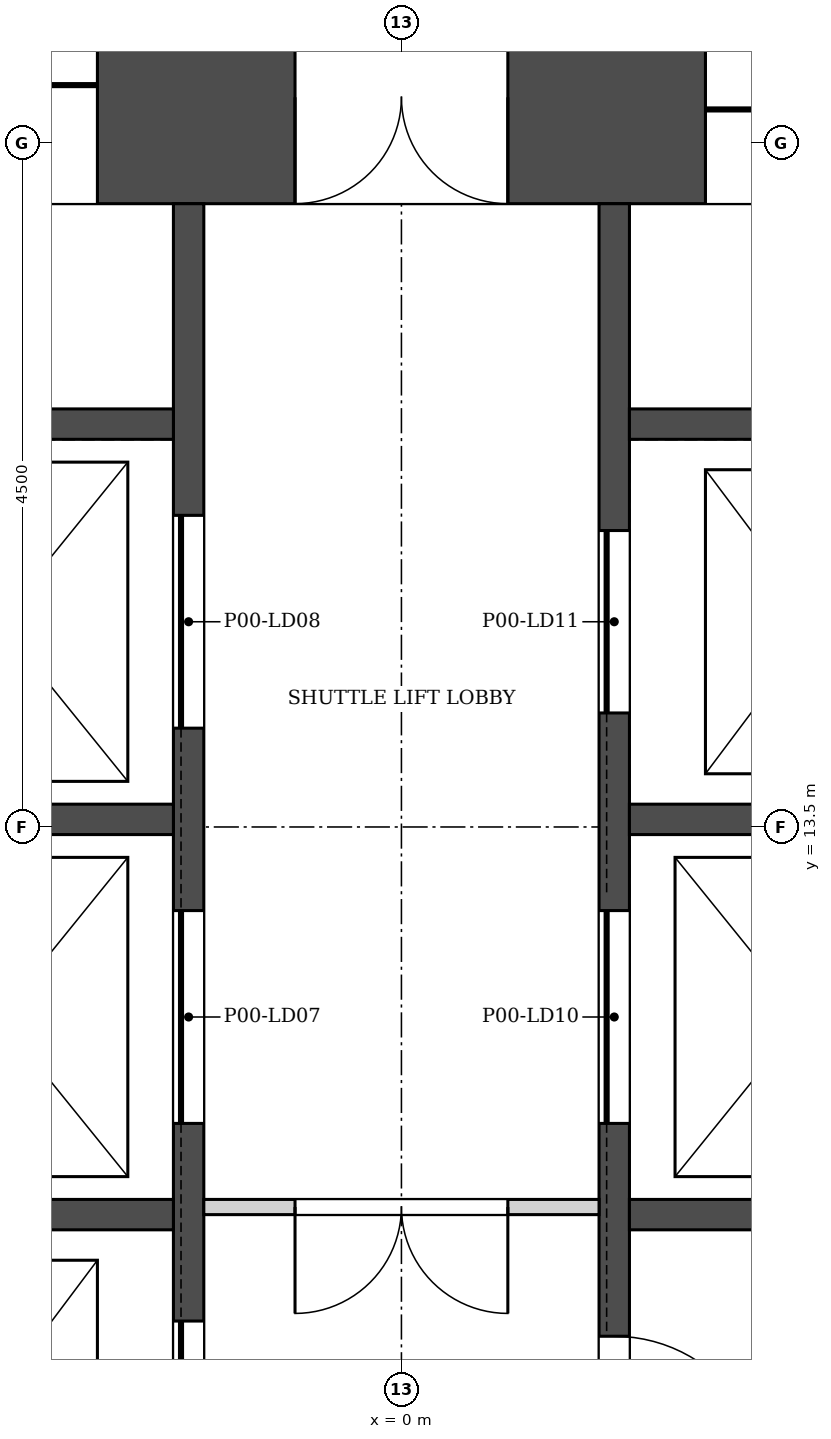
"""IFC4 building model, lengths in metres.
Left out: names, types, materials, properties, quantities, classifications, styles, units other than length and angle.
Written with IfcOpenShell. Run it as: python <this file> out.ifc"""

import sys

from ifc_helpers import new_model, si_unit, direction, frame, frame_2d, origin, place, context, subcontext, project, spatial, rectangle, extrude, element, fill, save


model = new_model("IFC4")
c1 = context("Model", 3, precision=1e-05, world=origin(), true_north=direction((0.0, 1.0)))
c2 = subcontext(c1, "Body", "Model", "MODEL_VIEW")
j1 = project(units=[si_unit("LENGTHUNIT", "METRE"), si_unit("PLANEANGLEUNIT", "RADIAN")], contexts=[c1])
p1 = place(None, origin())
s1 = spatial("IfcSite", under=j1, at=p1, CompositionType="ELEMENT")
p2 = place(p1, origin())
s2 = spatial("IfcBuilding", under=s1, at=p2, CompositionType="ELEMENT")
p3 = place(p2, origin())
s3 = spatial("IfcBuildingStorey", under=s2, at=p3, CompositionType="ELEMENT", Elevation=0.0)
p4 = place(p3, frame((9.412, 18.3, 0.0), z_axis=(0.0, 0.0, 1.0), x_axis=(-1.0, 0.0, 0.0)))
e1 = element("IfcWall", 1, at=p4, inside=s3, PredefinedType="SHEAR", context=c2, shape_type="SweptSolid", body=[
    extrude(rectangle(XDim=18.823, YDim=1.4, at=frame_2d((9.412, 0.0))), origin(), (0.0, 0.0, 1.0), 8.0),
])
p5 = place(p4, frame((8.711, 0.0, 0.0)))
e2 = element("IfcOpeningElement", 2, at=p5, cuts=e1, PredefinedType="OPENING", context=c2, shape_type="SweptSolid", body=[
    extrude(rectangle(XDim=1.4, YDim=2.1, at=frame_2d((0.7, 1.05))), frame((0.0, 0.71, 0.0), z_axis=(0.0, -1.0, 0.0), x_axis=(1.0, 0.0, 0.0)), (0.0, 0.0, 1.0), 1.42),
])
p6 = place(p4, frame((11.412, 0.0, 0.0)))
e3 = element("IfcOpeningElement", 3, at=p6, cuts=e1, PredefinedType="OPENING", context=c2, shape_type="SweptSolid", body=[
    extrude(rectangle(XDim=6.0, YDim=2.4, at=frame_2d((3.0, 1.2))), frame((0.0, 0.71, 0.0), z_axis=(0.0, -1.0, 0.0), x_axis=(1.0, 0.0, 0.0)), (0.0, 0.0, 1.0), 1.42),
])
p7 = place(p4, frame((1.412, 0.0, 0.0)))
e4 = element("IfcOpeningElement", 4, at=p7, cuts=e1, PredefinedType="OPENING", context=c2, shape_type="SweptSolid", body=[
    extrude(rectangle(XDim=6.0, YDim=2.4, at=frame_2d((3.0, 1.2))), frame((0.0, 0.71, 0.0), z_axis=(0.0, -1.0, 0.0), x_axis=(1.0, 0.0, 0.0)), (0.0, 0.0, 1.0), 1.42),
])
p8 = place(p3, frame((-1.4, 5.85, -0.4), z_axis=(0.0, 0.0, 1.0), x_axis=(0.0, 1.0, 0.0)))
e5 = element("IfcWall", 5, at=p8, inside=s3, PredefinedType="SOLIDWALL", context=c2, shape_type="SweptSolid", body=[
    extrude(rectangle(XDim=11.75, YDim=0.2, at=frame_2d((5.875, 0.0))), origin(), (0.0, 0.0, 1.0), 8.1),
])
p9 = place(p8, frame((3.2, 0.0, 0.4)))
e6 = element("IfcOpeningElement", 6, at=p9, cuts=e5, PredefinedType="OPENING", context=c2, shape_type="SweptSolid", body=[
    extrude(rectangle(XDim=1.2, YDim=2.1, at=frame_2d((0.6, 1.05))), frame((0.0, 0.11, 0.0), z_axis=(0.0, -1.0, 0.0), x_axis=(1.0, 0.0, 0.0)), (0.0, 0.0, 1.0), 0.22),
])
p10 = place(p8, frame((5.7, 0.0, 0.4)))
e7 = element("IfcOpeningElement", 7, at=p10, cuts=e5, PredefinedType="OPENING", context=c2, shape_type="SweptSolid", body=[
    extrude(rectangle(XDim=1.4, YDim=2.1, at=frame_2d((0.7, 1.05))), frame((0.0, 0.11, 0.0), z_axis=(0.0, -1.0, 0.0), x_axis=(1.0, 0.0, 0.0)), (0.0, 0.0, 1.0), 0.22),
])
p11 = place(p8, frame((8.3, 0.0, 0.4)))
e8 = element("IfcOpeningElement", 8, at=p11, cuts=e5, PredefinedType="OPENING", context=c2, shape_type="SweptSolid", body=[
    extrude(rectangle(XDim=1.4, YDim=2.1, at=frame_2d((0.7, 1.05))), frame((0.0, 0.11, 0.0), z_axis=(0.0, -1.0, 0.0), x_axis=(1.0, 0.0, 0.0)), (0.0, 0.0, 1.0), 0.22),
])
p12 = place(p8, frame((0.65, 0.0, 0.4)))
e9 = element("IfcOpeningElement", 9, at=p12, cuts=e5, PredefinedType="OPENING", context=c2, shape_type="SweptSolid", body=[
    extrude(rectangle(XDim=1.1, YDim=2.1, at=frame_2d((0.55, 1.05))), frame((0.0, 0.11, 0.0), z_axis=(0.0, -1.0, 0.0), x_axis=(1.0, 0.0, 0.0)), (0.0, 0.0, 1.0), 0.22),
])
p13 = place(p3, frame((1.4, 5.85, -0.4), z_axis=(0.0, 0.0, 1.0), x_axis=(0.0, 1.0, 0.0)))
e10 = element("IfcWall", 10, at=p13, inside=s3, PredefinedType="SOLIDWALL", context=c2, shape_type="SweptSolid", body=[
    extrude(rectangle(XDim=11.75, YDim=0.2, at=frame_2d((5.875, 0.0))), origin(), (0.0, 0.0, 1.0), 8.1),
])
p14 = place(p13, frame((5.7, 0.0, 0.4)))
e11 = element("IfcOpeningElement", 11, at=p14, cuts=e10, PredefinedType="OPENING", context=c2, shape_type="SweptSolid", body=[
    extrude(rectangle(XDim=1.4, YDim=2.1, at=frame_2d((0.7, 1.05))), frame((0.0, 0.11, 0.0), z_axis=(0.0, -1.0, 0.0), x_axis=(1.0, 0.0, 0.0)), (0.0, 0.0, 1.0), 0.22),
])
p15 = place(p13, frame((8.4, 0.0, 0.4)))
e12 = element("IfcOpeningElement", 12, at=p15, cuts=e10, PredefinedType="OPENING", context=c2, shape_type="SweptSolid", body=[
    extrude(rectangle(XDim=1.2, YDim=2.1, at=frame_2d((0.6, 1.05))), frame((0.0, 0.11, 0.0), z_axis=(0.0, -1.0, 0.0), x_axis=(1.0, 0.0, 0.0)), (0.0, 0.0, 1.0), 0.22),
])
p16 = place(p13, frame((0.65, 0.0, 0.4)))
e13 = element("IfcOpeningElement", 13, at=p16, cuts=e10, PredefinedType="OPENING", context=c2, shape_type="SweptSolid", body=[
    extrude(rectangle(XDim=1.1, YDim=2.1, at=frame_2d((0.55, 1.05))), frame((0.0, 0.11, 0.0), z_axis=(0.0, -1.0, 0.0), x_axis=(1.0, 0.0, 0.0)), (0.0, 0.0, 1.0), 0.22),
])
p17 = place(p13, frame((3.3, 0.0, 0.4)))
e14 = element("IfcOpeningElement", 14, at=p17, cuts=e10, PredefinedType="OPENING", context=c2, shape_type="SweptSolid", body=[
    extrude(rectangle(XDim=1.0, YDim=2.1, at=frame_2d((0.5, 1.05))), frame((0.0, 0.11, 0.0), z_axis=(0.0, -1.0, 0.0), x_axis=(1.0, 0.0, 0.0)), (0.0, 0.0, 1.0), 0.22),
])
for number, where, z_axis, x_axis in (
    (15, (-3.5, 10.95, -0.4), (0.0, 0.0, 1.0), (1.0, 0.0, 0.0)),
    (16, (-3.5, 13.55, -0.4), (0.0, 0.0, 1.0), (1.0, 0.0, 0.0)),
    (17, (-3.5, 16.15, -0.4), (0.0, 0.0, 1.0), (1.0, 0.0, 0.0)),
    (18, (1.5, 10.95, -0.4), (0.0, 0.0, 1.0), (1.0, 0.0, 0.0)),
    (19, (1.5, 13.55, -0.4), (0.0, 0.0, 1.0), (1.0, 0.0, 0.0)),
    (20, (1.5, 16.15, -0.4), (0.0, 0.0, 1.0), (1.0, 0.0, 0.0)),
):
    element("IfcWall", number, at=place(p3, frame(where, z_axis=z_axis, x_axis=x_axis)), inside=s3, PredefinedType="SOLIDWALL", context=c2, shape_type="SweptSolid", body=[
        extrude(rectangle(XDim=2.0, YDim=0.2, at=frame_2d((1.0, 0.0))), origin(), (0.0, 0.0, 1.0), 8.1),
    ])
p18 = place(p3, frame((-1.3, 11.0, 0.0), z_axis=(0.0, 0.0, 1.0), x_axis=(1.0, 0.0, 0.0)))
e21 = element("IfcWall", 21, at=p18, inside=s3, PredefinedType="PARTITIONING", context=c2, shape_type="SweptSolid", body=[
    extrude(rectangle(XDim=2.6, YDim=0.1, at=frame_2d((1.3, 0.0))), origin(), (0.0, 0.0, 1.0), 7.7),
])
p19 = place(p18, frame((0.6, 0.0, 0.0)))
e22 = element("IfcOpeningElement", 22, at=p19, cuts=e21, PredefinedType="OPENING", context=c2, shape_type="SweptSolid", body=[
    extrude(rectangle(XDim=1.4, YDim=2.1, at=frame_2d((0.7, 1.05))), frame((0.0, 0.06, 0.0), z_axis=(0.0, -1.0, 0.0), x_axis=(1.0, 0.0, 0.0)), (0.0, 0.0, 1.0), 0.12),
])
p20 = place(p9, origin())
e23 = element("IfcDoor", 23, at=p20, inside=s3, OperationType="SLIDING_TO_LEFT", PredefinedType="DOOR", context=c2, shape_type="SweptSolid", body=[
    extrude(rectangle(XDim=1.2, YDim=2.1, at=frame_2d((0.6, 1.05))), frame((0.0, 0.025, 0.0), z_axis=(0.0, -1.0, 0.0), x_axis=(1.0, 0.0, 0.0)), (0.0, 0.0, 1.0), 0.05),
])
fill(e6, e23)
p21 = place(p10, origin())
e24 = element("IfcDoor", 24, at=p21, inside=s3, OperationType="SLIDING_TO_LEFT", PredefinedType="DOOR", context=c2, shape_type="SweptSolid", body=[
    extrude(rectangle(XDim=1.4, YDim=2.1, at=frame_2d((0.7, 1.05))), frame((0.0, 0.025, 0.0), z_axis=(0.0, -1.0, 0.0), x_axis=(1.0, 0.0, 0.0)), (0.0, 0.0, 1.0), 0.05),
])
fill(e7, e24)
p22 = place(p11, origin())
e25 = element("IfcDoor", 25, at=p22, inside=s3, OperationType="SLIDING_TO_LEFT", PredefinedType="DOOR", context=c2, shape_type="SweptSolid", body=[
    extrude(rectangle(XDim=1.4, YDim=2.1, at=frame_2d((0.7, 1.05))), frame((0.0, 0.025, 0.0), z_axis=(0.0, -1.0, 0.0), x_axis=(1.0, 0.0, 0.0)), (0.0, 0.0, 1.0), 0.05),
])
fill(e8, e25)
p23 = place(p14, origin())
e26 = element("IfcDoor", 26, at=p23, inside=s3, OperationType="SLIDING_TO_LEFT", PredefinedType="DOOR", context=c2, shape_type="SweptSolid", body=[
    extrude(rectangle(XDim=1.4, YDim=2.1, at=frame_2d((0.7, 1.05))), frame((0.0, 0.025, 0.0), z_axis=(0.0, -1.0, 0.0), x_axis=(1.0, 0.0, 0.0)), (0.0, 0.0, 1.0), 0.05),
])
fill(e11, e26)
p24 = place(p15, origin())
e27 = element("IfcDoor", 27, at=p24, inside=s3, OperationType="SLIDING_TO_LEFT", PredefinedType="DOOR", context=c2, shape_type="SweptSolid", body=[
    extrude(rectangle(XDim=1.2, YDim=2.1, at=frame_2d((0.6, 1.05))), frame((0.0, 0.025, 0.0), z_axis=(0.0, -1.0, 0.0), x_axis=(1.0, 0.0, 0.0)), (0.0, 0.0, 1.0), 0.05),
])
fill(e12, e27)
p25 = place(p17, frame((1.0, 0.0, 0.0), z_axis=(0.0, 0.0, 1.0), x_axis=(-1.0, 0.0, 0.0)))
e28 = element("IfcDoor", 28, at=p25, inside=s3, OperationType="SINGLE_SWING_RIGHT", PredefinedType="DOOR", context=c2, shape_type="SweptSolid", body=[
    extrude(rectangle(XDim=1.0, YDim=2.1, at=frame_2d((0.5, 1.05))), frame((0.0, 0.025, 0.0), z_axis=(0.0, -1.0, 0.0), x_axis=(1.0, 0.0, 0.0)), (0.0, 0.0, 1.0), 0.05),
])
fill(e14, e28)
p26 = place(p19, frame((1.4, 0.0, 0.0), z_axis=(0.0, 0.0, 1.0), x_axis=(-1.0, 0.0, 0.0)))
e29 = element("IfcDoor", 29, at=p26, inside=s3, OperationType="DOUBLE_DOOR_SINGLE_SWING", PredefinedType="DOOR", context=c2, shape_type="SweptSolid", body=[
    extrude(rectangle(XDim=1.4, YDim=2.1, at=frame_2d((0.7, 1.05))), frame((0.0, 0.025, 0.0), z_axis=(0.0, -1.0, 0.0), x_axis=(1.0, 0.0, 0.0)), (0.0, 0.0, 1.0), 0.05),
])
fill(e22, e29)
p27 = place(p5, origin())
e30 = element("IfcDoor", 30, at=p27, inside=s3, OperationType="DOUBLE_DOOR_SINGLE_SWING", PredefinedType="DOOR", context=c2, shape_type="SweptSolid", body=[
    extrude(rectangle(XDim=1.4, YDim=2.1, at=frame_2d((0.7, 1.05))), frame((0.0, 0.025, 0.0), z_axis=(0.0, -1.0, 0.0), x_axis=(1.0, 0.0, 0.0)), (0.0, 0.0, 1.0), 0.05),
])
fill(e2, e30)
p28 = place(p6, origin())
e31 = element("IfcDoor", 31, at=p28, inside=s3, OperationType="DOUBLE_DOOR_SLIDING", PredefinedType="DOOR", context=c2, shape_type="SweptSolid", body=[
    extrude(rectangle(XDim=6.0, YDim=2.4, at=frame_2d((3.0, 1.2))), frame((0.0, 0.025, 0.0), z_axis=(0.0, -1.0, 0.0), x_axis=(1.0, 0.0, 0.0)), (0.0, 0.0, 1.0), 0.05),
])
fill(e3, e31)
p29 = place(p7, origin())
e32 = element("IfcDoor", 32, at=p29, inside=s3, OperationType="DOUBLE_DOOR_SLIDING", PredefinedType="DOOR", context=c2, shape_type="SweptSolid", body=[
    extrude(rectangle(XDim=6.0, YDim=2.4, at=frame_2d((3.0, 1.2))), frame((0.0, 0.025, 0.0), z_axis=(0.0, -1.0, 0.0), x_axis=(1.0, 0.0, 0.0)), (0.0, 0.0, 1.0), 0.05),
])
fill(e4, e32)
save(model, sys.argv[1])
